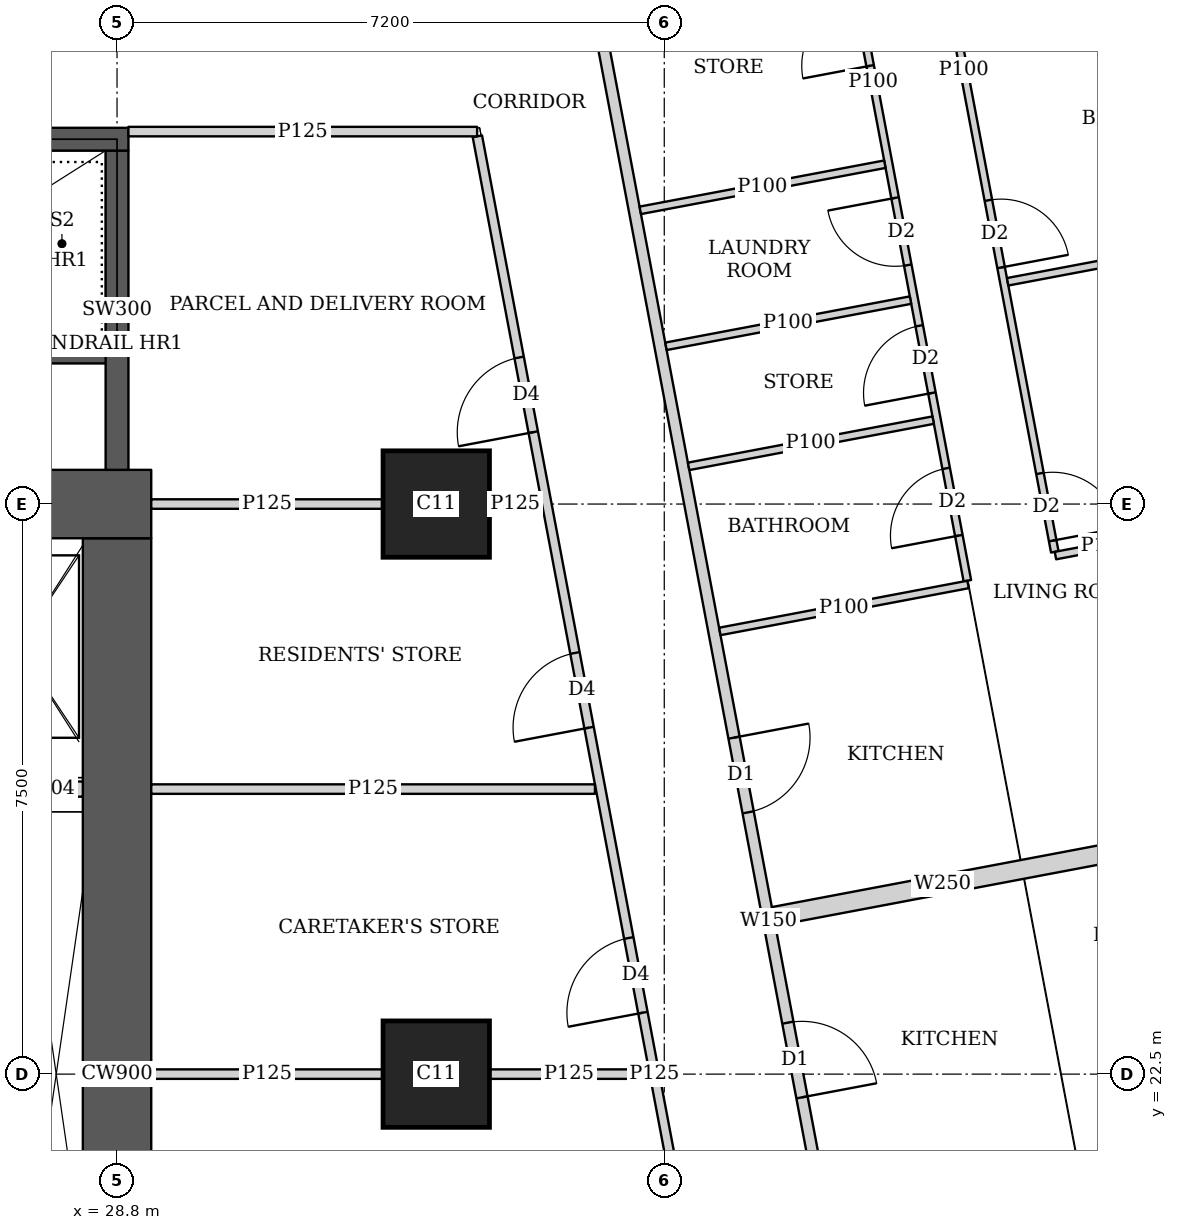
"""IFC4 building model, lengths in metres.
Left out: names, types, materials, properties, quantities, classifications, styles, units other than length and angle.
Written with IfcOpenShell. Run it as: python <this file> out.ifc"""

import sys

from ifc_helpers import new_model, si_unit, direction, frame, frame_2d, origin, origin_2d, place, context, subcontext, project, spatial, rectangle, extrude, element, fill, save


model = new_model("IFC4")
c1 = context("Model", 3, precision=1e-05, world=origin(), true_north=direction((0.0, 1.0)))
c2 = subcontext(c1, "Body", "Model", "MODEL_VIEW")
j1 = project(units=[si_unit("LENGTHUNIT", "METRE"), si_unit("PLANEANGLEUNIT", "RADIAN")], contexts=[c1])
p1 = place(None, origin())
s1 = spatial("IfcSite", under=j1, at=p1, CompositionType="ELEMENT")
p2 = place(p1, origin())
s2 = spatial("IfcBuilding", under=s1, at=p2, CompositionType="ELEMENT")
p3 = place(p2, frame((0.0, 0.0, 262.85)))
s3 = spatial("IfcBuildingStorey", under=s2, at=p3, CompositionType="ELEMENT", Elevation=262.85)
for number, where, z_axis, x_axis in (
    (1, (33.0, 22.5, 0.0), (0.0, 0.0, 1.0), (1.0, 0.0, 0.0)),
    (2, (33.0, 30.0, 0.0), (0.0, 0.0, 1.0), (1.0, 0.0, 0.0)),
):
    element("IfcColumn", number, at=place(p3, frame(where, z_axis=z_axis, x_axis=x_axis)), inside=s3, PredefinedType="COLUMN", context=c2, shape_type="SweptSolid", body=[
        extrude(rectangle(XDim=1.4, YDim=1.4, at=origin_2d()), origin(), (0.0, 0.0, 1.0), 3.75),
    ])
p4 = place(p3, frame((13.95, 30.0, 0.0), z_axis=(0.0, 0.0, 1.0), x_axis=(1.0, 0.0, 0.0)))
e3 = element("IfcWall", 3, at=p4, inside=s3, PredefinedType="SHEAR", context=c2, shape_type="SweptSolid", body=[
    extrude(rectangle(XDim=15.3, YDim=0.9, at=frame_2d((7.65, 0.0))), origin(), (0.0, 0.0, 1.0), 3.75),
])
p5 = place(p4, frame((4.45, 0.0, 0.0)))
e4 = element("IfcOpeningElement", 4, at=p5, cuts=e3, PredefinedType="OPENING", context=c2, shape_type="SweptSolid", body=[
    extrude(rectangle(XDim=1.8, YDim=2.1, at=frame_2d((0.9, 1.05))), frame((0.0, 0.46, 0.0), z_axis=(0.0, -1.0, 0.0), x_axis=(1.0, 0.0, 0.0)), (0.0, 0.0, 1.0), 0.92),
])
p6 = place(p4, frame((10.7, 0.0, 0.0)))
e5 = element("IfcOpeningElement", 5, at=p6, cuts=e3, PredefinedType="OPENING", context=c2, shape_type="SweptSolid", body=[
    extrude(rectangle(XDim=1.1, YDim=2.1, at=frame_2d((0.55, 1.05))), frame((0.0, 0.46, 0.0), z_axis=(0.0, -1.0, 0.0), x_axis=(1.0, 0.0, 0.0)), (0.0, 0.0, 1.0), 0.92),
])
p7 = place(p3, frame((28.8, 15.45, 0.0), z_axis=(0.0, 0.0, 1.0), x_axis=(0.0, 1.0, 0.0)))
e6 = element("IfcWall", 6, at=p7, inside=s3, PredefinedType="SHEAR", context=c2, shape_type="SweptSolid", body=[
    extrude(rectangle(XDim=14.1, YDim=0.9, at=frame_2d((7.05, 0.0))), origin(), (0.0, 0.0, 1.0), 3.75),
])
p8 = place(p3, frame((21.45, 34.8, 0.0), z_axis=(0.0, 0.0, 1.0), x_axis=(1.0, 0.0, 0.0)))
e7 = element("IfcWall", 7, at=p8, inside=s3, PredefinedType="SHEAR", context=c2, shape_type="SweptSolid", body=[
    extrude(rectangle(XDim=7.5, YDim=0.3, at=frame_2d((3.75, 0.0))), origin(), (0.0, 0.0, 1.0), 3.75),
])
p9 = place(p8, frame((0.5, 0.0, 0.0)))
e8 = element("IfcOpeningElement", 8, at=p9, cuts=e7, PredefinedType="OPENING", context=c2, shape_type="SweptSolid", body=[
    extrude(rectangle(XDim=1.1, YDim=2.1, at=frame_2d((0.55, 1.05))), frame((0.0, 0.16, 0.0), z_axis=(0.0, -1.0, 0.0), x_axis=(1.0, 0.0, 0.0)), (0.0, 0.0, 1.0), 0.32),
])
p10 = place(p3, frame((28.8, 30.45, 0.0), z_axis=(0.0, 0.0, 1.0), x_axis=(0.0, 1.0, 0.0)))
e9 = element("IfcWall", 9, at=p10, inside=s3, PredefinedType="SHEAR", context=c2, shape_type="SweptSolid", body=[
    extrude(rectangle(XDim=4.2, YDim=0.3, at=frame_2d((2.1, 0.0))), origin(), (0.0, 0.0, 1.0), 3.75),
])
p11 = place(p3, frame((34.036, 42.186, 0.0), z_axis=(0.0, 0.0, 1.0), x_axis=(0.185593518645, -0.9826266055, 0.0)))
e10 = element("IfcWall", 10, at=p11, inside=s3, PredefinedType="SOLIDWALL", context=c2, shape_type="SweptSolid", body=[
    extrude(rectangle(XDim=35.961, YDim=0.15, at=frame_2d((17.98, 0.0))), origin(), (0.0, 0.0, 1.0), 2.5),
])
p12 = place(p11, frame((15.529, 0.0, 0.0)))
e11 = element("IfcOpeningElement", 11, at=p12, cuts=e10, PredefinedType="OPENING", context=c2, shape_type="SweptSolid", body=[
    extrude(rectangle(XDim=1.0, YDim=2.1, at=frame_2d((0.5, 1.05))), frame((0.0, 0.085, 0.0), z_axis=(0.0, -1.0, 0.0), x_axis=(1.0, 0.0, 0.0)), (0.0, 0.0, 1.0), 0.17),
])
p13 = place(p11, frame((19.345, 0.0, 0.0)))
e12 = element("IfcOpeningElement", 12, at=p13, cuts=e10, PredefinedType="OPENING", context=c2, shape_type="SweptSolid", body=[
    extrude(rectangle(XDim=1.0, YDim=2.1, at=frame_2d((0.5, 1.05))), frame((0.0, 0.085, 0.0), z_axis=(0.0, -1.0, 0.0), x_axis=(1.0, 0.0, 0.0)), (0.0, 0.0, 1.0), 0.17),
])
p14 = place(p11, frame((30.594, 0.0, 0.0)))
e13 = element("IfcOpeningElement", 13, at=p14, cuts=e10, PredefinedType="OPENING", context=c2, shape_type="SweptSolid", body=[
    extrude(rectangle(XDim=1.0, YDim=2.1, at=frame_2d((0.5, 1.05))), frame((0.0, 0.085, 0.0), z_axis=(0.0, -1.0, 0.0), x_axis=(1.0, 0.0, 0.0)), (0.0, 0.0, 1.0), 0.17),
])
p15 = place(p3, frame((38.744, 42.045, 0.0), z_axis=(0.0, 0.0, 1.0), x_axis=(0.185614085367, -0.982622720739, 0.0)))
e14 = element("IfcWall", 14, at=p15, inside=s3, PredefinedType="PARTITIONING", context=c2, shape_type="SweptSolid", body=[
    extrude(rectangle(XDim=12.898, YDim=0.1, at=frame_2d((6.449, 0.0))), origin(), (0.0, 0.0, 1.0), 2.5),
])
p16 = place(p15, frame((11.848, 0.0, 0.0)))
e15 = element("IfcOpeningElement", 15, at=p16, cuts=e14, PredefinedType="OPENING", context=c2, shape_type="SweptSolid", body=[
    extrude(rectangle(XDim=0.9, YDim=2.1, at=frame_2d((0.45, 1.05))), frame((0.0, 0.06, 0.0), z_axis=(0.0, -1.0, 0.0), x_axis=(1.0, 0.0, 0.0)), (0.0, 0.0, 1.0), 0.12),
])
p17 = place(p15, frame((8.191, 0.0, 0.0)))
e16 = element("IfcOpeningElement", 16, at=p17, cuts=e14, PredefinedType="OPENING", context=c2, shape_type="SweptSolid", body=[
    extrude(rectangle(XDim=0.9, YDim=2.1, at=frame_2d((0.45, 1.05))), frame((0.0, 0.06, 0.0), z_axis=(0.0, -1.0, 0.0), x_axis=(1.0, 0.0, 0.0)), (0.0, 0.0, 1.0), 0.12),
])
p18 = place(p15, frame((4.215, 0.0, 0.0)))
e17 = element("IfcOpeningElement", 17, at=p18, cuts=e14, PredefinedType="OPENING", context=c2, shape_type="SweptSolid", body=[
    extrude(rectangle(XDim=0.9, YDim=2.1, at=frame_2d((0.45, 1.05))), frame((0.0, 0.06, 0.0), z_axis=(0.0, -1.0, 0.0), x_axis=(1.0, 0.0, 0.0)), (0.0, 0.0, 1.0), 0.12),
])
p19 = place(p3, frame((37.511, 42.109, 0.0), z_axis=(0.0, 0.0, 1.0), x_axis=(0.185550464988, -0.982634736279, 0.0)))
e18 = element("IfcWall", 18, at=p19, inside=s3, PredefinedType="PARTITIONING", context=c2, shape_type="SweptSolid", body=[
    extrude(rectangle(XDim=13.35, YDim=0.1, at=frame_2d((6.675, 0.0))), origin(), (0.0, 0.0, 1.0), 2.5),
])
p20 = place(p19, frame((11.845, 0.0, 0.0)))
e19 = element("IfcOpeningElement", 19, at=p20, cuts=e18, PredefinedType="OPENING", context=c2, shape_type="SweptSolid", body=[
    extrude(rectangle(XDim=0.9, YDim=2.1, at=frame_2d((0.45, 1.05))), frame((0.0, 0.06, 0.0), z_axis=(0.0, -1.0, 0.0), x_axis=(1.0, 0.0, 0.0)), (0.0, 0.0, 1.0), 0.12),
])
p21 = place(p19, frame((8.224, 0.0, 0.0)))
e20 = element("IfcOpeningElement", 20, at=p21, cuts=e18, PredefinedType="OPENING", context=c2, shape_type="SweptSolid", body=[
    extrude(rectangle(XDim=0.9, YDim=2.1, at=frame_2d((0.45, 1.05))), frame((0.0, 0.06, 0.0), z_axis=(0.0, -1.0, 0.0), x_axis=(1.0, 0.0, 0.0)), (0.0, 0.0, 1.0), 0.12),
])
p22 = place(p19, frame((2.65, 0.0, 0.0)))
e21 = element("IfcOpeningElement", 21, at=p22, cuts=e18, PredefinedType="OPENING", context=c2, shape_type="SweptSolid", body=[
    extrude(rectangle(XDim=0.9, YDim=2.1, at=frame_2d((0.45, 1.05))), frame((0.0, 0.06, 0.0), z_axis=(0.0, -1.0, 0.0), x_axis=(1.0, 0.0, 0.0)), (0.0, 0.0, 1.0), 0.12),
])
p23 = place(p19, frame((9.936, 0.0, 0.0)))
e22 = element("IfcOpeningElement", 22, at=p23, cuts=e18, PredefinedType="OPENING", context=c2, shape_type="SweptSolid", body=[
    extrude(rectangle(XDim=0.9, YDim=2.1, at=frame_2d((0.45, 1.05))), frame((0.0, 0.06, 0.0), z_axis=(0.0, -1.0, 0.0), x_axis=(1.0, 0.0, 0.0)), (0.0, 0.0, 1.0), 0.12),
])
p24 = place(p19, frame((5.555, 0.0, 0.0)))
e23 = element("IfcOpeningElement", 23, at=p24, cuts=e18, PredefinedType="OPENING", context=c2, shape_type="SweptSolid", body=[
    extrude(rectangle(XDim=0.9, YDim=2.1, at=frame_2d((0.45, 1.05))), frame((0.0, 0.06, 0.0), z_axis=(0.0, -1.0, 0.0), x_axis=(1.0, 0.0, 0.0)), (0.0, 0.0, 1.0), 0.12),
])
p25 = place(p3, frame((44.693, 33.713, 0.0), z_axis=(0.0, 0.0, 1.0), x_axis=(-0.982615600536, -0.185651775062, 0.0)))
e24 = element("IfcWall", 24, at=p25, inside=s3, PredefinedType="PARTITIONING", context=c2, shape_type="SweptSolid", body=[
    extrude(rectangle(XDim=4.249, YDim=0.1, at=frame_2d((2.125, 0.0))), origin(), (0.0, 0.0, 1.0), 2.5),
])
p26 = place(p3, frame((42.47, 29.572, 0.0), z_axis=(0.0, 0.0, 1.0), x_axis=(-0.982610503289, -0.185678751683, 0.0)))
e25 = element("IfcWall", 25, at=p26, inside=s3, PredefinedType="PARTITIONING", context=c2, shape_type="SweptSolid", body=[
    extrude(rectangle(XDim=1.346, YDim=0.1, at=frame_2d((0.673, 0.0))), origin(), (0.0, 0.0, 1.0), 2.5),
])
p27 = place(p3, frame((39.24, 32.683, 0.0), z_axis=(0.0, 0.0, 1.0), x_axis=(-0.982607026909, -0.185697147715, 0.0)))
e26 = element("IfcWall", 26, at=p27, inside=s3, PredefinedType="PARTITIONING", context=c2, shape_type="SweptSolid", body=[
    extrude(rectangle(XDim=3.275, YDim=0.1, at=frame_2d((1.637, 0.0))), origin(), (0.0, 0.0, 1.0), 3.5),
])
p28 = place(p3, frame((39.997, 28.942, 0.0), z_axis=(0.0, 0.0, 1.0), x_axis=(-0.982569883123, -0.185893584556, 0.0)))
e27 = element("IfcWall", 27, at=p28, inside=s3, PredefinedType="PARTITIONING", context=c2, shape_type="SweptSolid", body=[
    extrude(rectangle(XDim=3.324, YDim=0.1, at=frame_2d((1.662, 0.0))), origin(), (0.0, 0.0, 1.0), 3.5),
])
p29 = place(p3, frame((39.538, 31.104, 0.0), z_axis=(0.0, 0.0, 1.0), x_axis=(-0.982620626894, -0.185625169636, 0.0)))
e28 = element("IfcWall", 28, at=p29, inside=s3, PredefinedType="PARTITIONING", context=c2, shape_type="SweptSolid", body=[
    extrude(rectangle(XDim=3.275, YDim=0.1, at=frame_2d((1.637, 0.0))), origin(), (0.0, 0.0, 1.0), 2.5),
])
p30 = place(p3, frame((38.902, 34.471, 0.0), z_axis=(0.0, 0.0, 1.0), x_axis=(-0.982674977865, -0.185337227447, 0.0)))
e29 = element("IfcWall", 29, at=p30, inside=s3, PredefinedType="PARTITIONING", context=c2, shape_type="SweptSolid", body=[
    extrude(rectangle(XDim=3.275, YDim=0.1, at=frame_2d((1.637, 0.0))), origin(), (0.0, 0.0, 1.0), 3.5),
])
p31 = place(p3, frame((41.885, 25.415, 0.0), z_axis=(0.0, 0.0, 1.0), x_axis=(-0.982612837616, -0.185666398014, 0.0)))
e30 = element("IfcWall", 30, at=p31, inside=s3, PredefinedType="SOLIDWALL", context=c2, shape_type="SweptSolid", body=[
    extrude(rectangle(XDim=4.525, YDim=0.25, at=frame_2d((2.262, 0.0))), origin(), (0.0, 0.0, 1.0), 3.5),
])
p32 = place(p3, frame((28.95, 34.9, 0.0), z_axis=(0.0, 0.0, 1.0), x_axis=(1.0, 0.0, 0.0)))
e31 = element("IfcWall", 31, at=p32, inside=s3, PredefinedType="PARTITIONING", context=c2, shape_type="SweptSolid", body=[
    extrude(rectangle(XDim=4.588, YDim=0.125, at=frame_2d((2.294, 0.0))), origin(), (0.0, 0.0, 1.0), 3.5),
])
p33 = place(p3, frame((38.202, 10.163, 0.0), z_axis=(0.0, 0.0, 1.0), x_axis=(-0.185610321132, 0.982623431783, 0.0)))
e32 = element("IfcWall", 32, at=p33, inside=s3, PredefinedType="PARTITIONING", context=c2, shape_type="SweptSolid", body=[
    extrude(rectangle(XDim=25.111, YDim=0.125, at=frame_2d((12.556, 0.0))), origin(), (0.0, 0.0, 1.0), 2.5),
])
p34 = place(p33, frame((0.708, 0.0, 0.0)))
e33 = element("IfcOpeningElement", 33, at=p34, cuts=e32, PredefinedType="OPENING", context=c2, shape_type="SweptSolid", body=[
    extrude(rectangle(XDim=1.0, YDim=2.1, at=frame_2d((0.5, 1.05))), frame((0.0, 0.073, 0.0), z_axis=(0.0, -1.0, 0.0), x_axis=(1.0, 0.0, 0.0)), (0.0, 0.0, 1.0), 0.145),
])
p35 = place(p33, frame((5.9, 0.0, 0.0)))
e34 = element("IfcOpeningElement", 34, at=p35, cuts=e32, PredefinedType="OPENING", context=c2, shape_type="SweptSolid", body=[
    extrude(rectangle(XDim=1.0, YDim=2.1, at=frame_2d((0.5, 1.05))), frame((0.0, 0.073, 0.0), z_axis=(0.0, -1.0, 0.0), x_axis=(1.0, 0.0, 0.0)), (0.0, 0.0, 1.0), 0.145),
])
p36 = place(p33, frame((13.378, 0.0, 0.0)))
e35 = element("IfcOpeningElement", 35, at=p36, cuts=e32, PredefinedType="OPENING", context=c2, shape_type="SweptSolid", body=[
    extrude(rectangle(XDim=1.0, YDim=2.1, at=frame_2d((0.5, 1.05))), frame((0.0, 0.073, 0.0), z_axis=(0.0, -1.0, 0.0), x_axis=(1.0, 0.0, 0.0)), (0.0, 0.0, 1.0), 0.145),
])
p37 = place(p33, frame((17.194, 0.0, 0.0)))
e36 = element("IfcOpeningElement", 36, at=p37, cuts=e32, PredefinedType="OPENING", context=c2, shape_type="SweptSolid", body=[
    extrude(rectangle(XDim=1.0, YDim=2.1, at=frame_2d((0.5, 1.05))), frame((0.0, 0.073, 0.0), z_axis=(0.0, -1.0, 0.0), x_axis=(1.0, 0.0, 0.0)), (0.0, 0.0, 1.0), 0.145),
])
p38 = place(p33, frame((21.15, 0.0, 0.0)))
e37 = element("IfcOpeningElement", 37, at=p38, cuts=e32, PredefinedType="OPENING", context=c2, shape_type="SweptSolid", body=[
    extrude(rectangle(XDim=1.0, YDim=2.1, at=frame_2d((0.5, 1.05))), frame((0.0, 0.073, 0.0), z_axis=(0.0, -1.0, 0.0), x_axis=(1.0, 0.0, 0.0)), (0.0, 0.0, 1.0), 0.145),
])
p39 = place(p3, frame((29.25, 22.5, 0.0), z_axis=(0.0, 0.0, 1.0), x_axis=(1.0, 0.0, 0.0)))
e38 = element("IfcWall", 38, at=p39, inside=s3, PredefinedType="PARTITIONING", context=c2, shape_type="SweptSolid", body=[
    extrude(rectangle(XDim=3.049, YDim=0.125, at=frame_2d((1.524, 0.0))), origin(), (0.0, 0.0, 1.0), 3.5),
])
p40 = place(p3, frame((33.701, 22.5, 0.0), z_axis=(0.0, 0.0, 1.0), x_axis=(1.0, 0.0, 0.0)))
e39 = element("IfcWall", 39, at=p40, inside=s3, PredefinedType="PARTITIONING", context=c2, shape_type="SweptSolid", body=[
    extrude(rectangle(XDim=2.095, YDim=0.125, at=frame_2d((1.047, 0.0))), origin(), (0.0, 0.0, 1.0), 2.5),
])
p41 = place(p3, frame((29.25, 26.25, 0.0), z_axis=(0.0, 0.0, 1.0), x_axis=(1.0, 0.0, 0.0)))
e40 = element("IfcWall", 40, at=p41, inside=s3, PredefinedType="PARTITIONING", context=c2, shape_type="SweptSolid", body=[
    extrude(rectangle(XDim=5.838, YDim=0.125, at=frame_2d((2.919, 0.0))), origin(), (0.0, 0.0, 1.0), 3.5),
])
p42 = place(p3, frame((29.25, 30.0, 0.0), z_axis=(0.0, 0.0, 1.0), x_axis=(1.0, 0.0, 0.0)))
e41 = element("IfcWall", 41, at=p42, inside=s3, PredefinedType="PARTITIONING", context=c2, shape_type="SweptSolid", body=[
    extrude(rectangle(XDim=3.049, YDim=0.125, at=frame_2d((1.524, 0.0))), origin(), (0.0, 0.0, 1.0), 3.5),
])
p43 = place(p3, frame((33.701, 30.0, 0.0), z_axis=(0.0, 0.0, 1.0), x_axis=(1.0, 0.0, 0.0)))
e42 = element("IfcWall", 42, at=p43, inside=s3, PredefinedType="PARTITIONING", context=c2, shape_type="SweptSolid", body=[
    extrude(rectangle(XDim=0.678, YDim=0.125, at=frame_2d((0.339, 0.0))), origin(), (0.0, 0.0, 1.0), 2.5),
])
p44 = place(p3, frame((23.0, 31.95, 0.0), z_axis=(0.0, 0.0, 1.0), x_axis=(1.0, 0.0, 0.0)))
e43 = element("IfcWall", 43, at=p44, inside=s3, PredefinedType="SHEAR", context=c2, shape_type="SweptSolid", body=[
    extrude(rectangle(XDim=5.8, YDim=0.2, at=frame_2d((2.9, 0.0))), origin(), (0.0, 0.0, 1.0), 3.75),
])
p45 = place(p3, frame((27.4, 26.25, 0.0), z_axis=(0.0, 0.0, 1.0), x_axis=(1.0, 0.0, 0.0)))
e44 = element("IfcWall", 44, at=p45, inside=s3, PredefinedType="SOLIDWALL", context=c2, shape_type="SweptSolid", body=[
    extrude(rectangle(XDim=0.95, YDim=0.2, at=frame_2d((0.475, 0.0))), origin(), (0.0, 0.0, 1.0), 3.5),
])
p46 = place(p16, origin())
e45 = element("IfcDoor", 45, at=p46, inside=s3, OperationType="SINGLE_SWING_RIGHT", PredefinedType="DOOR", context=c2, shape_type="SweptSolid", body=[
    extrude(rectangle(XDim=0.9, YDim=2.1, at=frame_2d((0.45, 1.05))), frame((0.0, 0.025, 0.0), z_axis=(0.0, -1.0, 0.0), x_axis=(1.0, 0.0, 0.0)), (0.0, 0.0, 1.0), 0.05),
])
fill(e15, e45)
p47 = place(p17, origin())
e46 = element("IfcDoor", 46, at=p47, inside=s3, OperationType="SINGLE_SWING_RIGHT", PredefinedType="DOOR", context=c2, shape_type="SweptSolid", body=[
    extrude(rectangle(XDim=0.9, YDim=2.1, at=frame_2d((0.45, 1.05))), frame((0.0, 0.025, 0.0), z_axis=(0.0, -1.0, 0.0), x_axis=(1.0, 0.0, 0.0)), (0.0, 0.0, 1.0), 0.05),
])
fill(e16, e46)
p48 = place(p20, origin())
e47 = element("IfcDoor", 47, at=p48, inside=s3, OperationType="SINGLE_SWING_LEFT", PredefinedType="DOOR", context=c2, shape_type="SweptSolid", body=[
    extrude(rectangle(XDim=0.9, YDim=2.1, at=frame_2d((0.45, 1.05))), frame((0.0, 0.025, 0.0), z_axis=(0.0, -1.0, 0.0), x_axis=(1.0, 0.0, 0.0)), (0.0, 0.0, 1.0), 0.05),
])
fill(e19, e47)
p49 = place(p21, origin())
e48 = element("IfcDoor", 48, at=p49, inside=s3, OperationType="SINGLE_SWING_RIGHT", PredefinedType="DOOR", context=c2, shape_type="SweptSolid", body=[
    extrude(rectangle(XDim=0.9, YDim=2.1, at=frame_2d((0.45, 1.05))), frame((0.0, 0.025, 0.0), z_axis=(0.0, -1.0, 0.0), x_axis=(1.0, 0.0, 0.0)), (0.0, 0.0, 1.0), 0.05),
])
fill(e20, e48)
p50 = place(p23, origin())
e49 = element("IfcDoor", 49, at=p50, inside=s3, OperationType="SINGLE_SWING_LEFT", PredefinedType="DOOR", context=c2, shape_type="SweptSolid", body=[
    extrude(rectangle(XDim=0.9, YDim=2.1, at=frame_2d((0.45, 1.05))), frame((0.0, 0.025, 0.0), z_axis=(0.0, -1.0, 0.0), x_axis=(1.0, 0.0, 0.0)), (0.0, 0.0, 1.0), 0.05),
])
fill(e22, e49)
p51 = place(p24, origin())
e50 = element("IfcDoor", 50, at=p51, inside=s3, OperationType="SINGLE_SWING_LEFT", PredefinedType="DOOR", context=c2, shape_type="SweptSolid", body=[
    extrude(rectangle(XDim=0.9, YDim=2.1, at=frame_2d((0.45, 1.05))), frame((0.0, 0.025, 0.0), z_axis=(0.0, -1.0, 0.0), x_axis=(1.0, 0.0, 0.0)), (0.0, 0.0, 1.0), 0.05),
])
fill(e23, e50)
p52 = place(p12, origin())
e51 = element("IfcDoor", 51, at=p52, inside=s3, OperationType="SINGLE_SWING_LEFT", PredefinedType="DOOR", context=c2, shape_type="SweptSolid", body=[
    extrude(rectangle(XDim=1.0, YDim=2.1, at=frame_2d((0.5, 1.05))), frame((0.0, 0.025, 0.0), z_axis=(0.0, -1.0, 0.0), x_axis=(1.0, 0.0, 0.0)), (0.0, 0.0, 1.0), 0.05),
])
fill(e11, e51)
p53 = place(p13, origin())
e52 = element("IfcDoor", 52, at=p53, inside=s3, OperationType="SINGLE_SWING_RIGHT", PredefinedType="DOOR", context=c2, shape_type="SweptSolid", body=[
    extrude(rectangle(XDim=1.0, YDim=2.1, at=frame_2d((0.5, 1.05))), frame((0.0, 0.025, 0.0), z_axis=(0.0, -1.0, 0.0), x_axis=(1.0, 0.0, 0.0)), (0.0, 0.0, 1.0), 0.05),
])
fill(e12, e52)
p54 = place(p36, origin())
e53 = element("IfcDoor", 53, at=p54, inside=s3, OperationType="SINGLE_SWING_LEFT", PredefinedType="DOOR", context=c2, shape_type="SweptSolid", body=[
    extrude(rectangle(XDim=1.0, YDim=2.1, at=frame_2d((0.5, 1.05))), frame((0.0, 0.025, 0.0), z_axis=(0.0, -1.0, 0.0), x_axis=(1.0, 0.0, 0.0)), (0.0, 0.0, 1.0), 0.05),
])
fill(e35, e53)
p55 = place(p37, origin())
e54 = element("IfcDoor", 54, at=p55, inside=s3, OperationType="SINGLE_SWING_LEFT", PredefinedType="DOOR", context=c2, shape_type="SweptSolid", body=[
    extrude(rectangle(XDim=1.0, YDim=2.1, at=frame_2d((0.5, 1.05))), frame((0.0, 0.025, 0.0), z_axis=(0.0, -1.0, 0.0), x_axis=(1.0, 0.0, 0.0)), (0.0, 0.0, 1.0), 0.05),
])
fill(e36, e54)
p56 = place(p38, origin())
e55 = element("IfcDoor", 55, at=p56, inside=s3, OperationType="SINGLE_SWING_LEFT", PredefinedType="DOOR", context=c2, shape_type="SweptSolid", body=[
    extrude(rectangle(XDim=1.0, YDim=2.1, at=frame_2d((0.5, 1.05))), frame((0.0, 0.025, 0.0), z_axis=(0.0, -1.0, 0.0), x_axis=(1.0, 0.0, 0.0)), (0.0, 0.0, 1.0), 0.05),
])
fill(e37, e55)
save(model, sys.argv[1])
